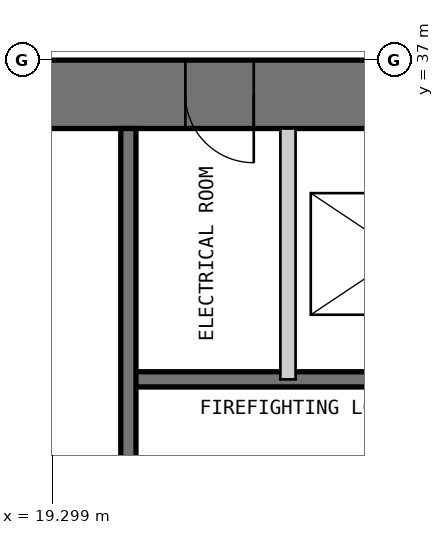
"""IFC4 building model, lengths in metres.
Left out: names, types, materials, properties, quantities, classifications, styles, units other than length and angle.
Written with IfcOpenShell. Run it as: python <this file> out.ifc"""

import sys

from ifc_helpers import new_model, si_unit, direction, frame, frame_2d, origin, place, context, subcontext, project, spatial, polyline, rectangle, outline, extrude, element, fill, save


model = new_model("IFC4")
c1 = context("Model", 3, precision=1e-05, world=origin(), true_north=direction((0.0, 1.0)))
c2 = subcontext(c1, "Body", "Model", "MODEL_VIEW")
j1 = project(units=[si_unit("LENGTHUNIT", "METRE"), si_unit("PLANEANGLEUNIT", "RADIAN")], contexts=[c1])
p1 = place(None, origin())
s1 = spatial("IfcSite", under=j1, at=p1, CompositionType="ELEMENT")
p2 = place(p1, origin())
s2 = spatial("IfcBuilding", under=s1, at=p2, CompositionType="ELEMENT")
p3 = place(p2, frame((0.0, 0.0, 21.4)))
s3 = spatial("IfcBuildingStorey", under=s2, at=p3, CompositionType="ELEMENT", Elevation=21.4)
p4 = place(p3, frame((37.0, 36.55, 0.0), z_axis=(0.0, 0.0, 1.0), x_axis=(-1.0, 0.0, 0.0)))
e1 = element("IfcWall", 1, at=p4, inside=s3, PredefinedType="SHEAR", context=c2, shape_type="SweptSolid", body=[
    extrude(outline(polyline([(0.0, -0.45), (24.0, -0.45), (23.1, 0.45), (0.9, 0.45), (0.0, -0.45)])), origin(), (0.0, 0.0, 1.0), 4.8),
])
p5 = place(p4, frame((4.9, 0.0, 0.0)))
e2 = element("IfcOpeningElement", 2, at=p5, cuts=e1, PredefinedType="OPENING", context=c2, shape_type="SweptSolid", body=[
    extrude(rectangle(XDim=1.0, YDim=2.2, at=frame_2d((0.5, 1.1))), frame((0.0, 0.46, 0.0), z_axis=(0.0, -1.0, 0.0), x_axis=(1.0, 0.0, 0.0)), (0.0, 0.0, 1.0), 0.92),
])
p6 = place(p4, frame((8.9, 0.0, 0.0)))
e3 = element("IfcOpeningElement", 3, at=p6, cuts=e1, PredefinedType="OPENING", context=c2, shape_type="SweptSolid", body=[
    extrude(rectangle(XDim=1.1, YDim=2.2, at=frame_2d((0.55, 1.1))), frame((0.0, 0.46, 0.0), z_axis=(0.0, -1.0, 0.0), x_axis=(1.0, 0.0, 0.0)), (0.0, 0.0, 1.0), 0.92),
])
p7 = place(p4, frame((15.05, 0.0, 0.0)))
e4 = element("IfcOpeningElement", 4, at=p7, cuts=e1, PredefinedType="OPENING", context=c2, shape_type="SweptSolid", body=[
    extrude(rectangle(XDim=0.9, YDim=2.2, at=frame_2d((0.45, 1.1))), frame((0.0, 0.46, 0.0), z_axis=(0.0, -1.0, 0.0), x_axis=(1.0, 0.0, 0.0)), (0.0, 0.0, 1.0), 0.92),
])
p8 = place(p4, frame((17.9, 0.0, 0.0)))
e5 = element("IfcOpeningElement", 5, at=p8, cuts=e1, PredefinedType="OPENING", context=c2, shape_type="SweptSolid", body=[
    extrude(rectangle(XDim=1.0, YDim=2.2, at=frame_2d((0.5, 1.1))), frame((0.0, 0.46, 0.0), z_axis=(0.0, -1.0, 0.0), x_axis=(1.0, 0.0, 0.0)), (0.0, 0.0, 1.0), 0.92),
])
p9 = place(p4, frame((21.4, 0.0, 0.0)))
e6 = element("IfcOpeningElement", 6, at=p9, cuts=e1, PredefinedType="OPENING", context=c2, shape_type="SweptSolid", body=[
    extrude(rectangle(XDim=1.0, YDim=2.2, at=frame_2d((0.5, 1.1))), frame((0.0, 0.46, 0.0), z_axis=(0.0, -1.0, 0.0), x_axis=(1.0, 0.0, 0.0)), (0.0, 0.0, 1.0), 0.92),
])
p10 = place(p3, frame((29.7, 32.8, 0.0), z_axis=(0.0, 0.0, 1.0), x_axis=(-1.0, 0.0, 0.0)))
e7 = element("IfcWall", 7, at=p10, inside=s3, PredefinedType="SOLIDWALL", context=c2, shape_type="SweptSolid", body=[
    extrude(rectangle(XDim=9.4, YDim=0.2, at=frame_2d((4.7, 0.0))), origin(), (0.0, 0.0, 1.0), 4.6),
])
p11 = place(p10, frame((0.25, 0.0, 0.0)))
e8 = element("IfcOpeningElement", 8, at=p11, cuts=e7, PredefinedType="OPENING", context=c2, shape_type="SweptSolid", body=[
    extrude(rectangle(XDim=1.0, YDim=2.2, at=frame_2d((0.5, 1.1))), frame((0.0, 0.11, 0.0), z_axis=(0.0, -1.0, 0.0), x_axis=(1.0, 0.0, 0.0)), (0.0, 0.0, 1.0), 0.22),
])
p12 = place(p3, frame((22.4, 36.1, 0.0), z_axis=(0.0, 0.0, 1.0), x_axis=(0.0, -1.0, 0.0)))
e9 = element("IfcWall", 9, at=p12, inside=s3, PredefinedType="PARTITIONING", context=c2, shape_type="SweptSolid", body=[
    extrude(rectangle(XDim=3.3, YDim=0.2, at=frame_2d((1.65, 0.0))), origin(), (0.0, 0.0, 1.0), 4.6),
])
p13 = place(p3, frame((20.3, 36.1, 0.0), z_axis=(0.0, 0.0, 1.0), x_axis=(0.0, -1.0, 0.0)))
e10 = element("IfcWall", 10, at=p13, inside=s3, PredefinedType="SOLIDWALL", context=c2, shape_type="SweptSolid", body=[
    extrude(rectangle(XDim=6.1, YDim=0.2, at=frame_2d((3.05, 0.0))), origin(), (0.0, 0.0, 1.0), 4.6),
])
p14 = place(p7, origin())
e11 = element("IfcDoor", 11, at=p14, inside=s3, OperationType="SINGLE_SWING_LEFT", PredefinedType="DOOR", context=c2, shape_type="SweptSolid", body=[
    extrude(rectangle(XDim=0.9, YDim=2.2, at=frame_2d((0.45, 1.1))), frame((0.0, 0.025, 0.0), z_axis=(0.0, -1.0, 0.0), x_axis=(1.0, 0.0, 0.0)), (0.0, 0.0, 1.0), 0.05),
    extrude(outline(polyline([(0.0, 0.0), (0.04, 0.0), (0.04, 2.16), (0.86, 2.16), (0.86, 0.0), (0.9, 0.0), (0.9, 2.2), (0.0, 2.2), (0.0, 0.0)])), frame((0.0, 0.3, 0.0), z_axis=(0.0, -1.0, 0.0), x_axis=(1.0, 0.0, 0.0)), (0.0, 0.0, 1.0), 0.6),
])
fill(e4, e11)
save(model, sys.argv[1])
